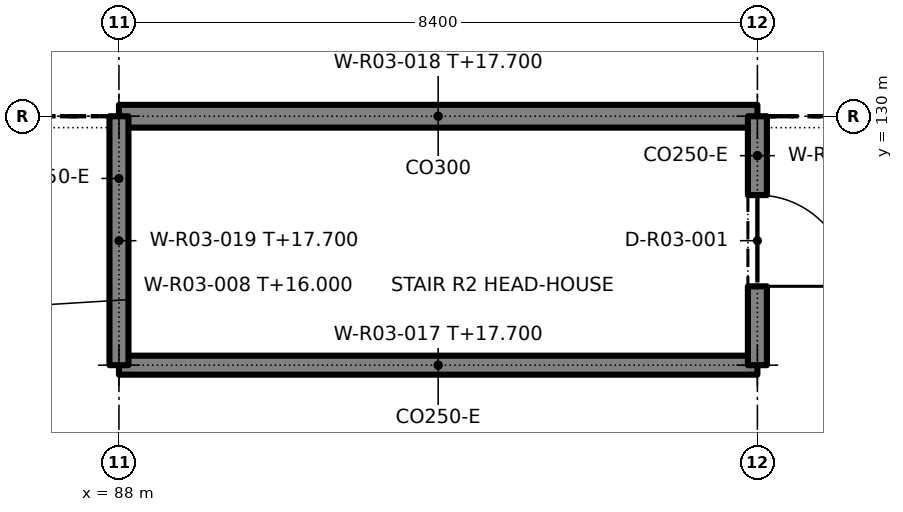
"""IFC4 building model, lengths in metres.
Left out: names, types, materials, properties, quantities, classifications, styles, units other than length and angle.
Written with IfcOpenShell. Run it as: python <this file> out.ifc"""

import sys

from ifc_helpers import new_model, si_unit, direction, frame, frame_2d, origin, place, context, subcontext, project, spatial, rectangle, extrude, element, fill, save


model = new_model("IFC4")
c1 = context("Model", 3, precision=1e-05, world=origin(), true_north=direction((0.0, 1.0)))
c2 = subcontext(c1, "Body", "Model", "MODEL_VIEW")
j1 = project(units=[si_unit("LENGTHUNIT", "METRE"), si_unit("PLANEANGLEUNIT", "RADIAN")], contexts=[c1])
p1 = place(None, origin())
s1 = spatial("IfcSite", under=j1, at=p1, CompositionType="ELEMENT")
p2 = place(p1, origin())
s2 = spatial("IfcBuilding", under=s1, at=p2, CompositionType="ELEMENT")
p3 = place(p2, frame((0.0, 0.0, 15.0)))
s3 = spatial("IfcBuildingStorey", under=s2, at=p3, CompositionType="ELEMENT", Elevation=15.0)
p4 = place(p3, frame((88.0, 126.725, 0.0), z_axis=(0.0, 0.0, 1.0), x_axis=(1.0, 0.0, 0.0)))
e1 = element("IfcWall", 1, at=p4, inside=s3, PredefinedType="SHEAR", context=c2, shape_type="SweptSolid", body=[
    extrude(rectangle(XDim=8.4, YDim=0.25, at=frame_2d((4.2, 0.0))), origin(), (0.0, 0.0, 1.0), 2.7),
])
p5 = place(p3, frame((88.0, 130.0, 0.0), z_axis=(0.0, 0.0, 1.0), x_axis=(1.0, 0.0, 0.0)))
e2 = element("IfcWall", 2, at=p5, inside=s3, PredefinedType="SHEAR", context=c2, shape_type="SweptSolid", body=[
    extrude(rectangle(XDim=8.4, YDim=0.3, at=frame_2d((4.2, 0.0))), origin(), (0.0, 0.0, 1.0), 2.7),
])
p6 = place(p3, frame((88.0, 126.725, 0.0), z_axis=(0.0, 0.0, 1.0), x_axis=(0.0, 1.0, 0.0)))
e3 = element("IfcWall", 3, at=p6, inside=s3, PredefinedType="SHEAR", context=c2, shape_type="SweptSolid", body=[
    extrude(rectangle(XDim=3.275, YDim=0.25, at=frame_2d((1.637, 0.0))), origin(), (0.0, 0.0, 1.0), 2.7),
])
p7 = place(p3, frame((96.4, 126.725, 0.0), z_axis=(0.0, 0.0, 1.0), x_axis=(0.0, 1.0, 0.0)))
e4 = element("IfcWall", 4, at=p7, inside=s3, PredefinedType="SHEAR", context=c2, shape_type="SweptSolid", body=[
    extrude(rectangle(XDim=3.275, YDim=0.25, at=frame_2d((1.637, 0.0))), origin(), (0.0, 0.0, 1.0), 2.7),
])
p8 = place(p7, frame((1.038, 0.0, 0.0)))
e5 = element("IfcOpeningElement", 5, at=p8, cuts=e4, PredefinedType="OPENING", context=c2, shape_type="SweptSolid", body=[
    extrude(rectangle(XDim=1.2, YDim=2.1, at=frame_2d((0.6, 1.05))), frame((0.0, 0.135, 0.0), z_axis=(0.0, -1.0, 0.0), x_axis=(1.0, 0.0, 0.0)), (0.0, 0.0, 1.0), 0.27),
])
p9 = place(p8, frame((1.2, 0.0, 0.0), z_axis=(0.0, 0.0, 1.0), x_axis=(-1.0, 0.0, 0.0)))
e6 = element("IfcDoor", 6, at=p9, inside=s3, OperationType="SINGLE_SWING_RIGHT", PredefinedType="DOOR", context=c2, shape_type="SweptSolid", body=[
    extrude(rectangle(XDim=1.2, YDim=2.1, at=frame_2d((0.6, 1.05))), frame((0.0, 0.025, 0.0), z_axis=(0.0, -1.0, 0.0), x_axis=(1.0, 0.0, 0.0)), (0.0, 0.0, 1.0), 0.05),
])
fill(e5, e6)
save(model, sys.argv[1])
